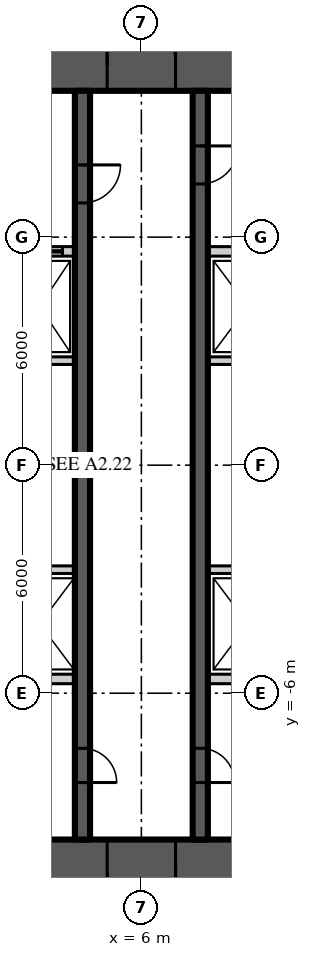
"""IFC4 building model, lengths in metres.
Left out: names, types, materials, properties, quantities, classifications, styles, units other than length and angle.
Written with IfcOpenShell. Run it as: python <this file> out.ifc"""

import sys

from ifc_helpers import new_model, si_unit, direction, frame, frame_2d, origin, place, context, subcontext, project, spatial, rectangle, extrude, element, fill, save


model = new_model("IFC4")
c1 = context("Model", 3, precision=1e-05, world=origin(), true_north=direction((0.0, 1.0)))
c2 = subcontext(c1, "Body", "Model", "MODEL_VIEW")
j1 = project(units=[si_unit("LENGTHUNIT", "METRE"), si_unit("PLANEANGLEUNIT", "RADIAN")], contexts=[c1])
p1 = place(None, origin())
s1 = spatial("IfcSite", under=j1, at=p1, CompositionType="ELEMENT")
p2 = place(p1, origin())
s2 = spatial("IfcBuilding", under=s1, at=p2, CompositionType="ELEMENT")
p3 = place(p2, frame((0.0, 0.0, 159.3)))
s3 = spatial("IfcBuildingStorey", under=s2, at=p3, CompositionType="ELEMENT", Elevation=159.3)
p4 = place(p3, frame((-11.15, 10.5, 0.0), z_axis=(0.0, 0.0, 1.0), x_axis=(1.0, 0.0, 0.0)))
e1 = element("IfcWall", 1, at=p4, inside=s3, PredefinedType="SHEAR", context=c2, shape_type="SweptSolid", body=[
    extrude(rectangle(XDim=22.3, YDim=1.3, at=frame_2d((11.15, 0.0))), origin(), (0.0, 0.0, 1.0), 3.9),
])
p5 = place(p4, frame((4.25, 0.0, 0.0)))
e2 = element("IfcOpeningElement", 2, at=p5, cuts=e1, PredefinedType="OPENING", context=c2, shape_type="SweptSolid", body=[
    extrude(rectangle(XDim=1.8, YDim=2.2, at=frame_2d((0.9, 1.1))), frame((0.0, 0.66, 0.0), z_axis=(0.0, -1.0, 0.0), x_axis=(1.0, 0.0, 0.0)), (0.0, 0.0, 1.0), 1.32),
])
p6 = place(p4, frame((16.25, 0.0, 0.0)))
e3 = element("IfcOpeningElement", 3, at=p6, cuts=e1, PredefinedType="OPENING", context=c2, shape_type="SweptSolid", body=[
    extrude(rectangle(XDim=1.8, YDim=2.2, at=frame_2d((0.9, 1.1))), frame((0.0, 0.66, 0.0), z_axis=(0.0, -1.0, 0.0), x_axis=(1.0, 0.0, 0.0)), (0.0, 0.0, 1.0), 1.32),
])
p7 = place(p3, frame((11.15, -10.5, 0.0), z_axis=(0.0, 0.0, 1.0), x_axis=(-1.0, 0.0, 0.0)))
e4 = element("IfcWall", 4, at=p7, inside=s3, PredefinedType="SHEAR", context=c2, shape_type="SweptSolid", body=[
    extrude(rectangle(XDim=22.3, YDim=1.3, at=frame_2d((11.15, 0.0))), origin(), (0.0, 0.0, 1.0), 3.9),
])
p8 = place(p7, frame((16.25, 0.0, 0.0)))
e5 = element("IfcOpeningElement", 5, at=p8, cuts=e4, PredefinedType="OPENING", context=c2, shape_type="SweptSolid", body=[
    extrude(rectangle(XDim=1.8, YDim=2.2, at=frame_2d((0.9, 1.1))), frame((0.0, 0.66, 0.0), z_axis=(0.0, -1.0, 0.0), x_axis=(1.0, 0.0, 0.0)), (0.0, 0.0, 1.0), 1.32),
])
p9 = place(p7, frame((4.25, 0.0, 0.0)))
e6 = element("IfcOpeningElement", 6, at=p9, cuts=e4, PredefinedType="OPENING", context=c2, shape_type="SweptSolid", body=[
    extrude(rectangle(XDim=1.8, YDim=2.2, at=frame_2d((0.9, 1.1))), frame((0.0, 0.66, 0.0), z_axis=(0.0, -1.0, 0.0), x_axis=(1.0, 0.0, 0.0)), (0.0, 0.0, 1.0), 1.32),
])
p10 = place(p3, frame((7.55, 9.85, 0.0), z_axis=(0.0, 0.0, 1.0), x_axis=(0.0, -1.0, 0.0)))
e7 = element("IfcWall", 7, at=p10, inside=s3, PredefinedType="SHEAR", context=c2, shape_type="SweptSolid", body=[
    extrude(rectangle(XDim=19.7, YDim=0.4, at=frame_2d((9.85, 0.0))), origin(), (0.0, 0.0, 1.0), 3.9),
])
p11 = place(p10, frame((1.45, 0.0, 0.0)))
e8 = element("IfcOpeningElement", 8, at=p11, cuts=e7, PredefinedType="OPENING", context=c2, shape_type="SweptSolid", body=[
    extrude(rectangle(XDim=1.0, YDim=2.2, at=frame_2d((0.5, 1.1))), frame((0.0, 0.21, 0.0), z_axis=(0.0, -1.0, 0.0), x_axis=(1.0, 0.0, 0.0)), (0.0, 0.0, 1.0), 0.42),
])
p12 = place(p10, frame((17.3, 0.0, 0.0)))
e9 = element("IfcOpeningElement", 9, at=p12, cuts=e7, PredefinedType="OPENING", context=c2, shape_type="SweptSolid", body=[
    extrude(rectangle(XDim=0.9, YDim=2.1, at=frame_2d((0.45, 1.05))), frame((0.0, 0.21, 0.0), z_axis=(0.0, -1.0, 0.0), x_axis=(1.0, 0.0, 0.0)), (0.0, 0.0, 1.0), 0.42),
])
p13 = place(p3, frame((4.45, 9.85, 0.0), z_axis=(0.0, 0.0, 1.0), x_axis=(0.0, -1.0, 0.0)))
e10 = element("IfcWall", 10, at=p13, inside=s3, PredefinedType="SHEAR", context=c2, shape_type="SweptSolid", body=[
    extrude(rectangle(XDim=19.7, YDim=0.4, at=frame_2d((9.85, 0.0))), origin(), (0.0, 0.0, 1.0), 3.9),
])
p14 = place(p13, frame((1.95, 0.0, 0.0)))
e11 = element("IfcOpeningElement", 11, at=p14, cuts=e10, PredefinedType="OPENING", context=c2, shape_type="SweptSolid", body=[
    extrude(rectangle(XDim=1.0, YDim=2.2, at=frame_2d((0.5, 1.1))), frame((0.0, 0.21, 0.0), z_axis=(0.0, -1.0, 0.0), x_axis=(1.0, 0.0, 0.0)), (0.0, 0.0, 1.0), 0.42),
])
p15 = place(p13, frame((17.3, 0.0, 0.0)))
e12 = element("IfcOpeningElement", 12, at=p15, cuts=e10, PredefinedType="OPENING", context=c2, shape_type="SweptSolid", body=[
    extrude(rectangle(XDim=0.9, YDim=2.1, at=frame_2d((0.45, 1.05))), frame((0.0, 0.21, 0.0), z_axis=(0.0, -1.0, 0.0), x_axis=(1.0, 0.0, 0.0)), (0.0, 0.0, 1.0), 0.42),
])
p16 = place(p3, frame((2.4, 5.625, 0.0), z_axis=(0.0, 0.0, 1.0), x_axis=(1.0, 0.0, 0.0)))
e13 = element("IfcWall", 13, at=p16, inside=s3, PredefinedType="SOLIDWALL", context=c2, shape_type="SweptSolid", body=[
    extrude(rectangle(XDim=1.85, YDim=0.25, at=frame_2d((0.925, 0.0))), origin(), (0.0, 0.0, 1.0), 3.7),
])
p17 = place(p16, frame((0.325, 0.0, 0.0)))
e14 = element("IfcOpeningElement", 14, at=p17, cuts=e13, PredefinedType="OPENING", context=c2, shape_type="SweptSolid", body=[
    extrude(rectangle(XDim=1.2, YDim=2.2, at=frame_2d((0.6, 1.1))), frame((0.0, 0.135, 0.0), z_axis=(0.0, -1.0, 0.0), x_axis=(1.0, 0.0, 0.0)), (0.0, 0.0, 1.0), 0.27),
])
p18 = place(p3, frame((7.75, 5.625, 0.0), z_axis=(0.0, 0.0, 1.0), x_axis=(1.0, 0.0, 0.0)))
e15 = element("IfcWall", 15, at=p18, inside=s3, PredefinedType="SOLIDWALL", context=c2, shape_type="SweptSolid", body=[
    extrude(rectangle(XDim=2.1, YDim=0.25, at=frame_2d((1.05, 0.0))), origin(), (0.0, 0.0, 1.0), 3.7),
])
p19 = place(p3, frame((2.4, -5.625, 0.0), z_axis=(0.0, 0.0, 1.0), x_axis=(1.0, 0.0, 0.0)))
e16 = element("IfcWall", 16, at=p19, inside=s3, PredefinedType="SOLIDWALL", context=c2, shape_type="SweptSolid", body=[
    extrude(rectangle(XDim=1.85, YDim=0.25, at=frame_2d((0.925, 0.0))), origin(), (0.0, 0.0, 1.0), 3.7),
])
p20 = place(p3, frame((7.75, -5.625, 0.0), z_axis=(0.0, 0.0, 1.0), x_axis=(1.0, 0.0, 0.0)))
e17 = element("IfcWall", 17, at=p20, inside=s3, PredefinedType="SOLIDWALL", context=c2, shape_type="SweptSolid", body=[
    extrude(rectangle(XDim=2.1, YDim=0.25, at=frame_2d((1.05, 0.0))), origin(), (0.0, 0.0, 1.0), 3.7),
])
p21 = place(p3, frame((2.4, -2.75, 0.0), z_axis=(0.0, 0.0, 1.0), x_axis=(1.0, 0.0, 0.0)))
e18 = element("IfcWall", 18, at=p21, inside=s3, PredefinedType="SOLIDWALL", context=c2, shape_type="SweptSolid", body=[
    extrude(rectangle(XDim=1.85, YDim=0.2, at=frame_2d((0.925, 0.0))), origin(), (0.0, 0.0, 1.0), 3.7),
])
p22 = place(p3, frame((7.75, -2.75, 0.0), z_axis=(0.0, 0.0, 1.0), x_axis=(1.0, 0.0, 0.0)))
e19 = element("IfcWall", 19, at=p22, inside=s3, PredefinedType="SOLIDWALL", context=c2, shape_type="SweptSolid", body=[
    extrude(rectangle(XDim=2.1, YDim=0.2, at=frame_2d((1.05, 0.0))), origin(), (0.0, 0.0, 1.0), 3.7),
])
p23 = place(p3, frame((2.4, 2.75, 0.0), z_axis=(0.0, 0.0, 1.0), x_axis=(1.0, 0.0, 0.0)))
e20 = element("IfcWall", 20, at=p23, inside=s3, PredefinedType="SOLIDWALL", context=c2, shape_type="SweptSolid", body=[
    extrude(rectangle(XDim=1.85, YDim=0.2, at=frame_2d((0.925, 0.0))), origin(), (0.0, 0.0, 1.0), 3.7),
])
p24 = place(p3, frame((7.75, 2.75, 0.0), z_axis=(0.0, 0.0, 1.0), x_axis=(1.0, 0.0, 0.0)))
e21 = element("IfcWall", 21, at=p24, inside=s3, PredefinedType="SOLIDWALL", context=c2, shape_type="SweptSolid", body=[
    extrude(rectangle(XDim=2.1, YDim=0.2, at=frame_2d((1.05, 0.0))), origin(), (0.0, 0.0, 1.0), 3.7),
])
p25 = place(p6, origin())
e22 = element("IfcDoor", 22, at=p25, inside=s3, OperationType="DOUBLE_DOOR_DOUBLE_SWING", PredefinedType="DOOR", context=c2, shape_type="SweptSolid", body=[
    extrude(rectangle(XDim=1.8, YDim=2.2, at=frame_2d((0.9, 1.1))), frame((0.0, 0.025, 0.0), z_axis=(0.0, -1.0, 0.0), x_axis=(1.0, 0.0, 0.0)), (0.0, 0.0, 1.0), 0.05),
])
fill(e3, e22)
p26 = place(p9, origin())
e23 = element("IfcDoor", 23, at=p26, inside=s3, OperationType="DOUBLE_DOOR_DOUBLE_SWING", PredefinedType="DOOR", context=c2, shape_type="SweptSolid", body=[
    extrude(rectangle(XDim=1.8, YDim=2.2, at=frame_2d((0.9, 1.1))), frame((0.0, 0.025, 0.0), z_axis=(0.0, -1.0, 0.0), x_axis=(1.0, 0.0, 0.0)), (0.0, 0.0, 1.0), 0.05),
])
fill(e6, e23)
p27 = place(p11, origin())
e24 = element("IfcDoor", 24, at=p27, inside=s3, OperationType="SINGLE_SWING_LEFT", PredefinedType="DOOR", context=c2, shape_type="SweptSolid", body=[
    extrude(rectangle(XDim=1.0, YDim=2.2, at=frame_2d((0.5, 1.1))), frame((0.0, 0.025, 0.0), z_axis=(0.0, -1.0, 0.0), x_axis=(1.0, 0.0, 0.0)), (0.0, 0.0, 1.0), 0.05),
])
fill(e8, e24)
p28 = place(p14, origin())
e25 = element("IfcDoor", 25, at=p28, inside=s3, OperationType="SINGLE_SWING_LEFT", PredefinedType="DOOR", context=c2, shape_type="SweptSolid", body=[
    extrude(rectangle(XDim=1.0, YDim=2.2, at=frame_2d((0.5, 1.1))), frame((0.0, 0.025, 0.0), z_axis=(0.0, -1.0, 0.0), x_axis=(1.0, 0.0, 0.0)), (0.0, 0.0, 1.0), 0.05),
])
fill(e11, e25)
p29 = place(p12, origin())
e26 = element("IfcDoor", 26, at=p29, inside=s3, OperationType="SINGLE_SWING_RIGHT", PredefinedType="DOOR", context=c2, shape_type="SweptSolid", body=[
    extrude(rectangle(XDim=0.9, YDim=2.1, at=frame_2d((0.45, 1.05))), frame((0.0, 0.025, 0.0), z_axis=(0.0, -1.0, 0.0), x_axis=(1.0, 0.0, 0.0)), (0.0, 0.0, 1.0), 0.05),
])
fill(e9, e26)
p30 = place(p15, origin())
e27 = element("IfcDoor", 27, at=p30, inside=s3, OperationType="SINGLE_SWING_RIGHT", PredefinedType="DOOR", context=c2, shape_type="SweptSolid", body=[
    extrude(rectangle(XDim=0.9, YDim=2.1, at=frame_2d((0.45, 1.05))), frame((0.0, 0.025, 0.0), z_axis=(0.0, -1.0, 0.0), x_axis=(1.0, 0.0, 0.0)), (0.0, 0.0, 1.0), 0.05),
])
fill(e12, e27)
p31 = place(p17, origin())
e28 = element("IfcDoor", 28, at=p31, inside=s3, OperationType="SLIDING_TO_LEFT", PredefinedType="DOOR", context=c2, shape_type="SweptSolid", body=[
    extrude(rectangle(XDim=1.2, YDim=2.2, at=frame_2d((0.6, 1.1))), frame((0.0, 0.025, 0.0), z_axis=(0.0, -1.0, 0.0), x_axis=(1.0, 0.0, 0.0)), (0.0, 0.0, 1.0), 0.05),
])
fill(e14, e28)
save(model, sys.argv[1])
